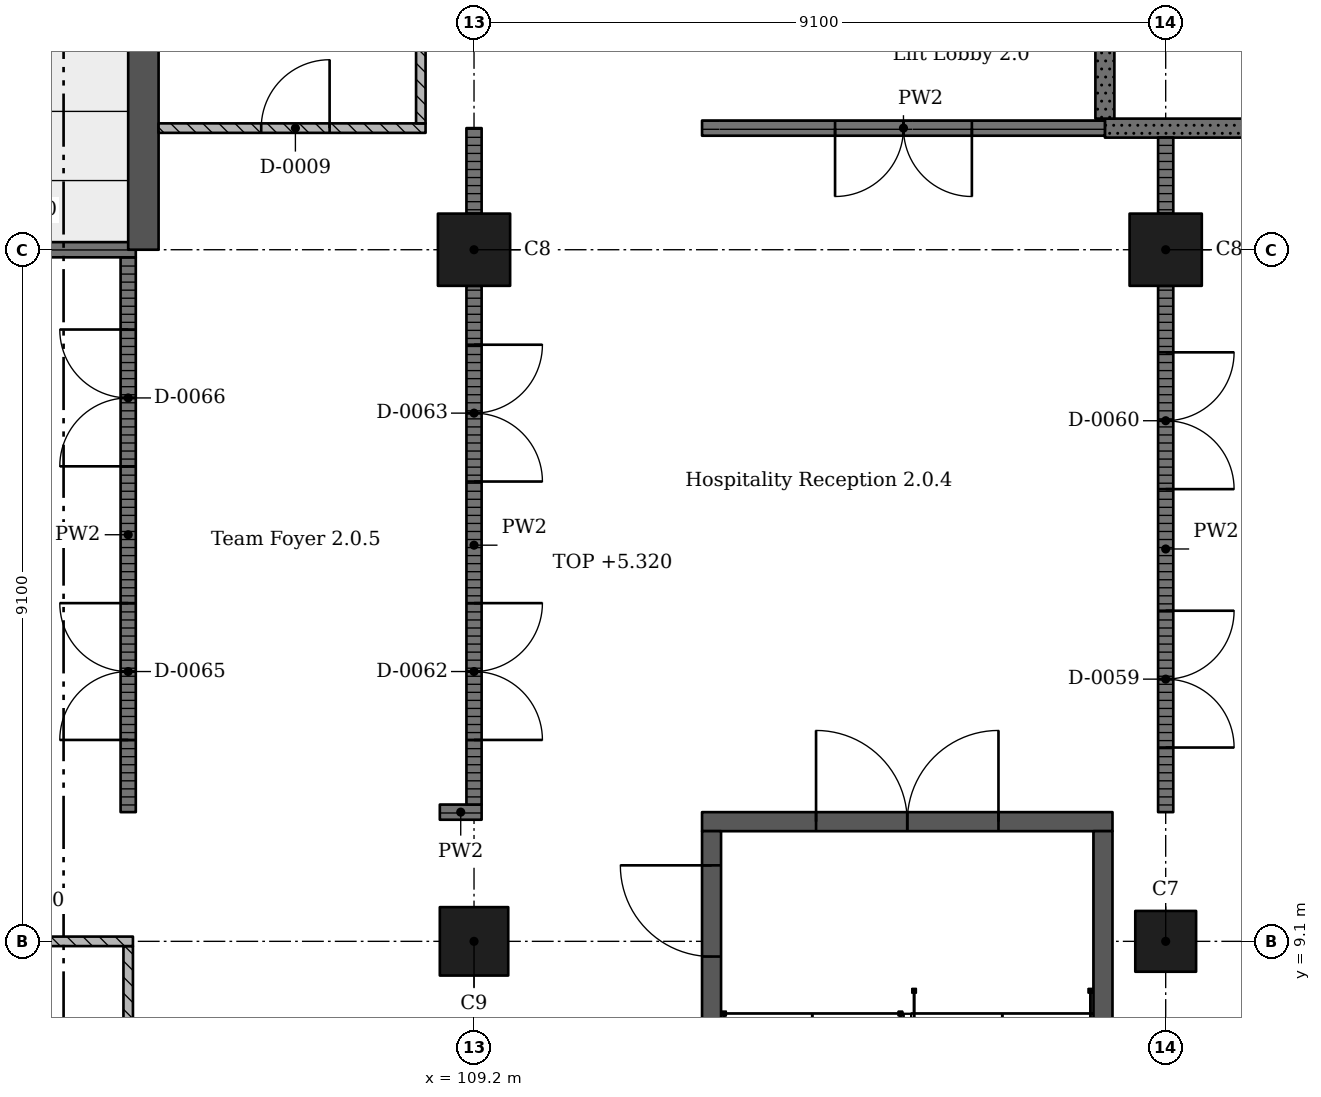
"""IFC4 building model, lengths in metres.
Left out: names, types, materials, properties, quantities, classifications, styles, units other than length and angle.
Written with IfcOpenShell. Run it as: python <this file> out.ifc"""

import sys

from ifc_helpers import new_model, si_unit, direction, frame, frame_2d, origin, origin_2d, place, context, subcontext, project, spatial, rectangle, extrude, element, fill, save


model = new_model("IFC4")
c1 = context("Model", 3, precision=1e-05, world=origin(), true_north=direction((0.0, 1.0)))
c2 = subcontext(c1, "Body", "Model", "MODEL_VIEW")
j1 = project(units=[si_unit("LENGTHUNIT", "METRE"), si_unit("PLANEANGLEUNIT", "RADIAN")], contexts=[c1])
p1 = place(None, origin())
s1 = spatial("IfcSite", under=j1, at=p1, CompositionType="ELEMENT")
p2 = place(p1, origin())
s2 = spatial("IfcBuilding", under=s1, at=p2, CompositionType="ELEMENT")
p3 = place(p2, origin())
s3 = spatial("IfcBuildingStorey", under=s2, at=p3, CompositionType="ELEMENT", Elevation=0.0)
p4 = place(p3, frame((109.2, 9.1, -0.4), z_axis=(0.0, 0.0, 1.0), x_axis=(1.0, 0.0, 0.0)))
e1 = element("IfcColumn", 1, at=p4, inside=s3, PredefinedType="COLUMN", context=c2, shape_type="SweptSolid", body=[
    extrude(rectangle(XDim=0.9, YDim=0.9, at=origin_2d()), origin(), (0.0, 0.0, 1.0), 6.77),
])
p5 = place(p3, frame((109.2, 18.2, -0.4), z_axis=(0.0, 0.0, 1.0), x_axis=(1.0, 0.0, 0.0)))
e2 = element("IfcColumn", 2, at=p5, inside=s3, PredefinedType="COLUMN", context=c2, shape_type="SweptSolid", body=[
    extrude(rectangle(XDim=0.95, YDim=0.95, at=origin_2d()), origin(), (0.0, 0.0, 1.0), 6.77),
])
p6 = place(p3, frame((118.3, 9.1, -0.4), z_axis=(0.0, 0.0, 1.0), x_axis=(1.0, 0.0, 0.0)))
e3 = element("IfcColumn", 3, at=p6, inside=s3, PredefinedType="COLUMN", context=c2, shape_type="SweptSolid", body=[
    extrude(rectangle(XDim=0.8, YDim=0.8, at=origin_2d()), origin(), (0.0, 0.0, 1.0), 6.77),
])
p7 = place(p3, frame((118.3, 18.2, -0.4), z_axis=(0.0, 0.0, 1.0), x_axis=(1.0, 0.0, 0.0)))
e4 = element("IfcColumn", 4, at=p7, inside=s3, PredefinedType="COLUMN", context=c2, shape_type="SweptSolid", body=[
    extrude(rectangle(XDim=0.95, YDim=0.95, at=origin_2d()), origin(), (0.0, 0.0, 1.0), 6.77),
])
p8 = place(p3, frame((104.85, 36.4, -0.4), z_axis=(0.0, 0.0, 1.0), x_axis=(0.0, -1.0, 0.0)))
e5 = element("IfcWall", 5, at=p8, inside=s3, PredefinedType="SHEAR", context=c2, shape_type="SweptSolid", body=[
    extrude(rectangle(XDim=18.2, YDim=0.4, at=frame_2d((9.1, 0.0))), origin(), (0.0, 0.0, 1.0), 6.77),
])
p9 = place(p3, frame((117.6, 10.675, -0.4), z_axis=(0.0, 0.0, 1.0), x_axis=(-1.0, 0.0, 0.0)))
e6 = element("IfcWall", 6, at=p9, inside=s3, PredefinedType="SHEAR", context=c2, shape_type="SweptSolid", body=[
    extrude(rectangle(XDim=5.4, YDim=0.25, at=frame_2d((2.7, 0.0))), origin(), (0.0, 0.0, 1.0), 6.77),
])
p10 = place(p9, frame((1.5, 0.0, 0.4)))
e7 = element("IfcOpeningElement", 7, at=p10, cuts=e6, PredefinedType="OPENING", context=c2, shape_type="SweptSolid", body=[
    extrude(rectangle(XDim=2.4, YDim=2.1, at=frame_2d((1.2, 1.05))), frame((0.0, 0.135, 0.0), z_axis=(0.0, -1.0, 0.0), x_axis=(1.0, 0.0, 0.0)), (0.0, 0.0, 1.0), 0.27),
])
p11 = place(p3, frame((112.325, 10.55, -0.4), z_axis=(0.0, 0.0, 1.0), x_axis=(0.0, -1.0, 0.0)))
e8 = element("IfcWall", 8, at=p11, inside=s3, PredefinedType="SHEAR", context=c2, shape_type="SweptSolid", body=[
    extrude(rectangle(XDim=9.6, YDim=0.25, at=frame_2d((4.8, 0.0))), origin(), (0.0, 0.0, 1.0), 6.77),
])
p12 = place(p11, frame((0.45, 0.0, 0.4)))
e9 = element("IfcOpeningElement", 9, at=p12, cuts=e8, PredefinedType="OPENING", context=c2, shape_type="SweptSolid", body=[
    extrude(rectangle(XDim=1.2, YDim=2.1, at=frame_2d((0.6, 1.05))), frame((0.0, 0.135, 0.0), z_axis=(0.0, -1.0, 0.0), x_axis=(1.0, 0.0, 0.0)), (0.0, 0.0, 1.0), 0.27),
])
p13 = place(p3, frame((117.475, 10.55, -0.4), z_axis=(0.0, 0.0, 1.0), x_axis=(0.0, -1.0, 0.0)))
e10 = element("IfcWall", 10, at=p13, inside=s3, PredefinedType="SHEAR", context=c2, shape_type="SweptSolid", body=[
    extrude(rectangle(XDim=9.6, YDim=0.25, at=frame_2d((4.8, 0.0))), origin(), (0.0, 0.0, 1.0), 6.77),
])
p14 = place(p3, frame((100.4, 18.2, 0.0), z_axis=(0.0, 0.0, 1.0), x_axis=(1.0, 0.0, 0.0)))
e11 = element("IfcWall", 11, at=p14, inside=s3, PredefinedType="PARTITIONING", context=c2, shape_type="SweptSolid", body=[
    extrude(rectangle(XDim=4.35, YDim=0.2, at=frame_2d((2.175, 0.0))), origin(), (0.0, 0.0, 1.0), 5.02),
])
p15 = place(p3, frame((104.65, 0.15, 0.0), z_axis=(0.0, 0.0, 1.0), x_axis=(0.0, 1.0, 0.0)))
e12 = element("IfcWall", 12, at=p15, inside=s3, PredefinedType="PARTITIONING", context=c2, shape_type="SweptSolid", body=[
    extrude(rectangle(XDim=8.888, YDim=0.125, at=frame_2d((4.444, 0.0))), origin(), (0.0, 0.0, 1.0), 6.02),
])
p16 = place(p3, frame((104.65, 10.8, 0.0), z_axis=(0.0, 0.0, 1.0), x_axis=(0.0, 1.0, 0.0)))
e13 = element("IfcWall", 13, at=p16, inside=s3, PredefinedType="PARTITIONING", context=c2, shape_type="SweptSolid", body=[
    extrude(rectangle(XDim=7.3, YDim=0.2, at=frame_2d((3.65, 0.0))), origin(), (0.0, 0.0, 1.0), 6.02),
])
p17 = place(p16, frame((0.95, 0.0, 0.0)))
e14 = element("IfcOpeningElement", 14, at=p17, cuts=e13, PredefinedType="OPENING", context=c2, shape_type="SweptSolid", body=[
    extrude(rectangle(XDim=1.8, YDim=2.4, at=frame_2d((0.9, 1.2))), frame((0.0, 0.11, 0.0), z_axis=(0.0, -1.0, 0.0), x_axis=(1.0, 0.0, 0.0)), (0.0, 0.0, 1.0), 0.22),
])
p18 = place(p16, frame((4.55, 0.0, 0.0)))
e15 = element("IfcOpeningElement", 15, at=p18, cuts=e13, PredefinedType="OPENING", context=c2, shape_type="SweptSolid", body=[
    extrude(rectangle(XDim=1.8, YDim=2.4, at=frame_2d((0.9, 1.2))), frame((0.0, 0.11, 0.0), z_axis=(0.0, -1.0, 0.0), x_axis=(1.0, 0.0, 0.0)), (0.0, 0.0, 1.0), 0.22),
])
p19 = place(p3, frame((104.712, 9.1, 0.0), z_axis=(0.0, 0.0, 1.0), x_axis=(-1.0, 0.0, 0.0)))
e16 = element("IfcWall", 16, at=p19, inside=s3, PredefinedType="PARTITIONING", context=c2, shape_type="SweptSolid", body=[
    extrude(rectangle(XDim=4.062, YDim=0.125, at=frame_2d((2.031, 0.0))), origin(), (0.0, 0.0, 1.0), 5.32),
])
p20 = place(p19, frame((1.55, 0.0, 0.0)))
e17 = element("IfcOpeningElement", 17, at=p20, cuts=e16, PredefinedType="OPENING", context=c2, shape_type="SweptSolid", body=[
    extrude(rectangle(XDim=1.0, YDim=2.1, at=frame_2d((0.5, 1.05))), frame((0.0, 0.073, 0.0), z_axis=(0.0, -1.0, 0.0), x_axis=(1.0, 0.0, 0.0)), (0.0, 0.0, 1.0), 0.145),
])
p21 = place(p3, frame((105.05, 19.8, 0.0), z_axis=(0.0, 0.0, 1.0), x_axis=(1.0, 0.0, 0.0)))
e18 = element("IfcWall", 18, at=p21, inside=s3, PredefinedType="PARTITIONING", context=c2, shape_type="SweptSolid", body=[
    extrude(rectangle(XDim=3.512, YDim=0.125, at=frame_2d((1.756, 0.0))), origin(), (0.0, 0.0, 1.0), 6.02),
])
p22 = place(p21, frame((1.35, 0.0, 0.0)))
e19 = element("IfcOpeningElement", 19, at=p22, cuts=e18, PredefinedType="OPENING", context=c2, shape_type="SweptSolid", body=[
    extrude(rectangle(XDim=0.9, YDim=2.1, at=frame_2d((0.45, 1.05))), frame((0.0, 0.073, 0.0), z_axis=(0.0, -1.0, 0.0), x_axis=(1.0, 0.0, 0.0)), (0.0, 0.0, 1.0), 0.145),
])
p23 = place(p3, frame((108.5, 19.863, 0.0), z_axis=(0.0, 0.0, 1.0), x_axis=(0.0, 1.0, 0.0)))
e20 = element("IfcWall", 20, at=p23, inside=s3, PredefinedType="PARTITIONING", context=c2, shape_type="SweptSolid", body=[
    extrude(rectangle(XDim=7.012, YDim=0.125, at=frame_2d((3.506, 0.0))), origin(), (0.0, 0.0, 1.0), 6.02),
])
p24 = place(p3, frame((108.75, 10.8, 0.0), z_axis=(0.0, 0.0, 1.0), x_axis=(1.0, 0.0, 0.0)))
e21 = element("IfcWall", 21, at=p24, inside=s3, PredefinedType="PARTITIONING", context=c2, shape_type="SweptSolid", body=[
    extrude(rectangle(XDim=0.55, YDim=0.2, at=frame_2d((0.275, 0.0))), origin(), (0.0, 0.0, 1.0), 6.02),
])
p25 = place(p3, frame((109.2, 10.9, 0.0), z_axis=(0.0, 0.0, 1.0), x_axis=(0.0, 1.0, 0.0)))
e22 = element("IfcWall", 22, at=p25, inside=s3, PredefinedType="PARTITIONING", context=c2, shape_type="SweptSolid", body=[
    extrude(rectangle(XDim=6.825, YDim=0.2, at=frame_2d((3.413, 0.0))), origin(), (0.0, 0.0, 1.0), 5.32),
])
p26 = place(p25, frame((0.85, 0.0, 0.0)))
e23 = element("IfcOpeningElement", 23, at=p26, cuts=e22, PredefinedType="OPENING", context=c2, shape_type="SweptSolid", body=[
    extrude(rectangle(XDim=1.8, YDim=2.4, at=frame_2d((0.9, 1.2))), frame((0.0, 0.11, 0.0), z_axis=(0.0, -1.0, 0.0), x_axis=(1.0, 0.0, 0.0)), (0.0, 0.0, 1.0), 0.22),
])
p27 = place(p25, frame((4.25, 0.0, 0.0)))
e24 = element("IfcOpeningElement", 24, at=p27, cuts=e22, PredefinedType="OPENING", context=c2, shape_type="SweptSolid", body=[
    extrude(rectangle(XDim=1.8, YDim=2.4, at=frame_2d((0.9, 1.2))), frame((0.0, 0.11, 0.0), z_axis=(0.0, -1.0, 0.0), x_axis=(1.0, 0.0, 0.0)), (0.0, 0.0, 1.0), 0.22),
])
p28 = place(p3, frame((109.2, 18.675, 0.0), z_axis=(0.0, 0.0, 1.0), x_axis=(0.0, 1.0, 0.0)))
e25 = element("IfcWall", 25, at=p28, inside=s3, PredefinedType="PARTITIONING", context=c2, shape_type="SweptSolid", body=[
    extrude(rectangle(XDim=1.125, YDim=0.2, at=frame_2d((0.562, 0.0))), origin(), (0.0, 0.0, 1.0), 5.32),
])
p29 = place(p3, frame((112.2, 19.8, 0.0), z_axis=(0.0, 0.0, 1.0), x_axis=(1.0, 0.0, 0.0)))
e26 = element("IfcWall", 26, at=p29, inside=s3, PredefinedType="PARTITIONING", context=c2, shape_type="SweptSolid", body=[
    extrude(rectangle(XDim=5.3, YDim=0.2, at=frame_2d((2.65, 0.0))), origin(), (0.0, 0.0, 1.0), 6.02),
])
p30 = place(p29, frame((1.75, 0.0, 0.0)))
e27 = element("IfcOpeningElement", 27, at=p30, cuts=e26, PredefinedType="OPENING", context=c2, shape_type="SweptSolid", body=[
    extrude(rectangle(XDim=1.8, YDim=2.4, at=frame_2d((0.9, 1.2))), frame((0.0, 0.11, 0.0), z_axis=(0.0, -1.0, 0.0), x_axis=(1.0, 0.0, 0.0)), (0.0, 0.0, 1.0), 0.22),
])
p31 = place(p3, frame((117.5, 19.8, 0.0), z_axis=(0.0, 0.0, 1.0), x_axis=(1.0, 0.0, 0.0)))
e28 = element("IfcWall", 28, at=p31, inside=s3, PredefinedType="SOLIDWALL", context=c2, shape_type="SweptSolid", body=[
    extrude(rectangle(XDim=3.8, YDim=0.25, at=frame_2d((1.9, 0.0))), origin(), (0.0, 0.0, 1.0), 6.02),
])
p32 = place(p31, frame((1.85, 0.0, 0.0)))
e29 = element("IfcOpeningElement", 29, at=p32, cuts=e28, PredefinedType="OPENING", context=c2, shape_type="SweptSolid", body=[
    extrude(rectangle(XDim=1.0, YDim=2.1, at=frame_2d((0.5, 1.05))), frame((0.0, 0.135, 0.0), z_axis=(0.0, -1.0, 0.0), x_axis=(1.0, 0.0, 0.0)), (0.0, 0.0, 1.0), 0.27),
])
p33 = place(p3, frame((117.5, 19.925, 0.0), z_axis=(0.0, 0.0, 1.0), x_axis=(0.0, 1.0, 0.0)))
e30 = element("IfcWall", 30, at=p33, inside=s3, PredefinedType="SOLIDWALL", context=c2, shape_type="SweptSolid", body=[
    extrude(rectangle(XDim=2.845, YDim=0.25, at=frame_2d((1.422, 0.0))), origin(), (0.0, 0.0, 1.0), 6.02),
])
p34 = place(p3, frame((118.3, 10.8, 0.0), z_axis=(0.0, 0.0, 1.0), x_axis=(0.0, 1.0, 0.0)))
e31 = element("IfcWall", 31, at=p34, inside=s3, PredefinedType="PARTITIONING", context=c2, shape_type="SweptSolid", body=[
    extrude(rectangle(XDim=6.925, YDim=0.2, at=frame_2d((3.462, 0.0))), origin(), (0.0, 0.0, 1.0), 5.32),
])
p35 = place(p34, frame((0.85, 0.0, 0.0)))
e32 = element("IfcOpeningElement", 32, at=p35, cuts=e31, PredefinedType="OPENING", context=c2, shape_type="SweptSolid", body=[
    extrude(rectangle(XDim=1.8, YDim=2.4, at=frame_2d((0.9, 1.2))), frame((0.0, 0.11, 0.0), z_axis=(0.0, -1.0, 0.0), x_axis=(1.0, 0.0, 0.0)), (0.0, 0.0, 1.0), 0.22),
])
p36 = place(p34, frame((4.25, 0.0, 0.0)))
e33 = element("IfcOpeningElement", 33, at=p36, cuts=e31, PredefinedType="OPENING", context=c2, shape_type="SweptSolid", body=[
    extrude(rectangle(XDim=1.8, YDim=2.4, at=frame_2d((0.9, 1.2))), frame((0.0, 0.11, 0.0), z_axis=(0.0, -1.0, 0.0), x_axis=(1.0, 0.0, 0.0)), (0.0, 0.0, 1.0), 0.22),
])
p37 = place(p3, frame((118.3, 18.675, 0.0), z_axis=(0.0, 0.0, 1.0), x_axis=(0.0, 1.0, 0.0)))
e34 = element("IfcWall", 34, at=p37, inside=s3, PredefinedType="PARTITIONING", context=c2, shape_type="SweptSolid", body=[
    extrude(rectangle(XDim=1.0, YDim=0.2, at=frame_2d((0.5, 0.0))), origin(), (0.0, 0.0, 1.0), 5.32),
])
p38 = place(p22, origin())
e35 = element("IfcDoor", 35, at=p38, inside=s3, OperationType="SINGLE_SWING_LEFT", PredefinedType="DOOR", context=c2, shape_type="SweptSolid", body=[
    extrude(rectangle(XDim=0.9, YDim=2.1, at=frame_2d((0.45, 1.05))), frame((0.0, 0.025, 0.0), z_axis=(0.0, -1.0, 0.0), x_axis=(1.0, 0.0, 0.0)), (0.0, 0.0, 1.0), 0.05),
])
fill(e19, e35)
p39 = place(p35, origin())
e36 = element("IfcDoor", 36, at=p39, inside=s3, OperationType="DOUBLE_DOOR_SINGLE_SWING", PredefinedType="DOOR", context=c2, shape_type="SweptSolid", body=[
    extrude(rectangle(XDim=1.8, YDim=2.4, at=frame_2d((0.9, 1.2))), frame((0.0, 0.025, 0.0), z_axis=(0.0, -1.0, 0.0), x_axis=(1.0, 0.0, 0.0)), (0.0, 0.0, 1.0), 0.05),
])
fill(e32, e36)
p40 = place(p36, origin())
e37 = element("IfcDoor", 37, at=p40, inside=s3, OperationType="DOUBLE_DOOR_SINGLE_SWING", PredefinedType="DOOR", context=c2, shape_type="SweptSolid", body=[
    extrude(rectangle(XDim=1.8, YDim=2.4, at=frame_2d((0.9, 1.2))), frame((0.0, 0.025, 0.0), z_axis=(0.0, -1.0, 0.0), x_axis=(1.0, 0.0, 0.0)), (0.0, 0.0, 1.0), 0.05),
])
fill(e33, e37)
p41 = place(p26, origin())
e38 = element("IfcDoor", 38, at=p41, inside=s3, OperationType="DOUBLE_DOOR_SINGLE_SWING", PredefinedType="DOOR", context=c2, shape_type="SweptSolid", body=[
    extrude(rectangle(XDim=1.8, YDim=2.4, at=frame_2d((0.9, 1.2))), frame((0.0, 0.025, 0.0), z_axis=(0.0, -1.0, 0.0), x_axis=(1.0, 0.0, 0.0)), (0.0, 0.0, 1.0), 0.05),
])
fill(e23, e38)
p42 = place(p27, origin())
e39 = element("IfcDoor", 39, at=p42, inside=s3, OperationType="DOUBLE_DOOR_SINGLE_SWING", PredefinedType="DOOR", context=c2, shape_type="SweptSolid", body=[
    extrude(rectangle(XDim=1.8, YDim=2.4, at=frame_2d((0.9, 1.2))), frame((0.0, 0.025, 0.0), z_axis=(0.0, -1.0, 0.0), x_axis=(1.0, 0.0, 0.0)), (0.0, 0.0, 1.0), 0.05),
])
fill(e24, e39)
p43 = place(p30, origin())
e40 = element("IfcDoor", 40, at=p43, inside=s3, OperationType="DOUBLE_DOOR_SINGLE_SWING", PredefinedType="DOOR", context=c2, shape_type="SweptSolid", body=[
    extrude(rectangle(XDim=1.8, YDim=2.4, at=frame_2d((0.9, 1.2))), frame((0.0, 0.025, 0.0), z_axis=(0.0, -1.0, 0.0), x_axis=(1.0, 0.0, 0.0)), (0.0, 0.0, 1.0), 0.05),
])
fill(e27, e40)
p44 = place(p17, origin())
e41 = element("IfcDoor", 41, at=p44, inside=s3, OperationType="DOUBLE_DOOR_SINGLE_SWING", PredefinedType="DOOR", context=c2, shape_type="SweptSolid", body=[
    extrude(rectangle(XDim=1.8, YDim=2.4, at=frame_2d((0.9, 1.2))), frame((0.0, 0.025, 0.0), z_axis=(0.0, -1.0, 0.0), x_axis=(1.0, 0.0, 0.0)), (0.0, 0.0, 1.0), 0.05),
])
fill(e14, e41)
p45 = place(p18, origin())
e42 = element("IfcDoor", 42, at=p45, inside=s3, OperationType="DOUBLE_DOOR_SINGLE_SWING", PredefinedType="DOOR", context=c2, shape_type="SweptSolid", body=[
    extrude(rectangle(XDim=1.8, YDim=2.4, at=frame_2d((0.9, 1.2))), frame((0.0, 0.025, 0.0), z_axis=(0.0, -1.0, 0.0), x_axis=(1.0, 0.0, 0.0)), (0.0, 0.0, 1.0), 0.05),
])
fill(e15, e42)
p46 = place(p10, origin())
e43 = element("IfcDoor", 43, at=p46, inside=s3, OperationType="DOUBLE_DOOR_SINGLE_SWING", PredefinedType="DOOR", context=c2, shape_type="SweptSolid", body=[
    extrude(rectangle(XDim=2.4, YDim=2.1, at=frame_2d((1.2, 1.05))), frame((0.0, 0.025, 0.0), z_axis=(0.0, -1.0, 0.0), x_axis=(1.0, 0.0, 0.0)), (0.0, 0.0, 1.0), 0.05),
])
fill(e7, e43)
p47 = place(p12, origin())
e44 = element("IfcDoor", 44, at=p47, inside=s3, OperationType="SINGLE_SWING_LEFT", PredefinedType="DOOR", context=c2, shape_type="SweptSolid", body=[
    extrude(rectangle(XDim=1.2, YDim=2.1, at=frame_2d((0.6, 1.05))), frame((0.0, 0.025, 0.0), z_axis=(0.0, -1.0, 0.0), x_axis=(1.0, 0.0, 0.0)), (0.0, 0.0, 1.0), 0.05),
])
fill(e9, e44)
save(model, sys.argv[1])
